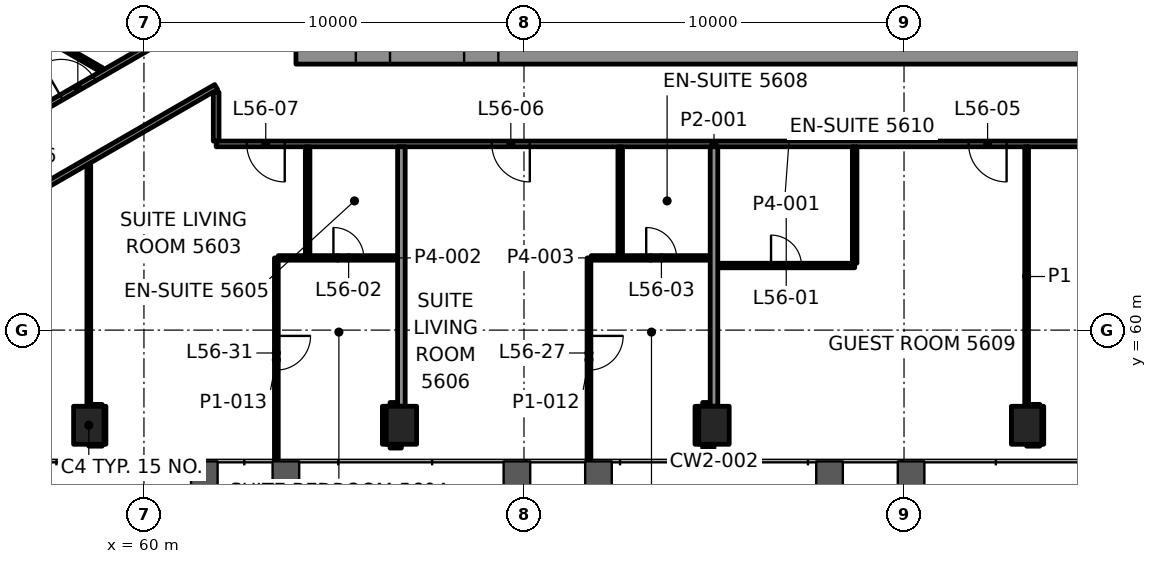
"""IFC4 building model, lengths in metres.
Left out: names, types, materials, properties, quantities, classifications, styles, units other than length and angle.
Written with IfcOpenShell. Run it as: python <this file> out.ifc"""

import sys

from ifc_helpers import new_model, si_unit, direction, frame, frame_2d, origin, origin_2d, place, context, subcontext, project, spatial, rectangle, hollow_rectangle, extrude, element, fill, save


model = new_model("IFC4")
c1 = context("Model", 3, precision=1e-05, world=origin(), true_north=direction((0.0, 1.0)))
c2 = subcontext(c1, "Body", "Model", "MODEL_VIEW")
j1 = project(units=[si_unit("LENGTHUNIT", "METRE"), si_unit("PLANEANGLEUNIT", "RADIAN")], contexts=[c1])
p1 = place(None, origin())
s1 = spatial("IfcSite", under=j1, at=p1, CompositionType="ELEMENT")
p2 = place(p1, origin())
s2 = spatial("IfcBuilding", under=s1, at=p2, CompositionType="ELEMENT")
p3 = place(p2, frame((0.0, 0.0, 237.7)))
s3 = spatial("IfcBuildingStorey", under=s2, at=p3, CompositionType="ELEMENT", Elevation=237.7)
for number, where, z_axis, x_axis in (
    (1, (58.549, 57.496, -0.0), (0.0, 0.0, 1.0), (1.0, 0.0, 0.0)),
    (2, (66.774, 57.496, -0.0), (0.0, 0.0, 1.0), (1.0, 0.0, 0.0)),
    (3, (75.0, 57.496, -0.0), (0.0, 0.0, 1.0), (1.0, 0.0, 0.0)),
    (4, (83.226, 57.496, -0.0), (0.0, 0.0, 1.0), (1.0, 0.0, 0.0)),
):
    element("IfcColumn", number, at=place(p3, frame(where, z_axis=z_axis, x_axis=x_axis)), inside=s3, PredefinedType="COLUMN", context=c2, shape_type="SweptSolid", body=[
        extrude(hollow_rectangle(XDim=0.8, YDim=1.0, WallThickness=0.05, at=origin_2d()), origin(), (0.0, 0.0, 1.0), 3.9),
    ])
p4 = place(p3, frame((64.0, 67.375, 0.0), z_axis=(0.0, 0.0, 1.0), x_axis=(1.0, 0.0, 0.0)))
e5 = element("IfcWall", 5, at=p4, inside=s3, PredefinedType="SHEAR", context=c2, shape_type="SweptSolid", body=[
    extrude(rectangle(XDim=22.0, YDim=0.75, at=frame_2d((11.0, 0.0))), origin(), (0.0, 0.0, 1.0), 3.6),
])
p5 = place(p4, frame((1.575, 0.0, 0.0)))
e6 = element("IfcOpeningElement", 6, at=p5, cuts=e5, PredefinedType="OPENING", context=c2, shape_type="SweptSolid", body=[
    extrude(rectangle(XDim=0.9, YDim=2.1, at=frame_2d((0.45, 1.05))), frame((0.0, 0.385, 0.0), z_axis=(0.0, -1.0, 0.0), x_axis=(1.0, 0.0, 0.0)), (0.0, 0.0, 1.0), 0.77),
])
p6 = place(p4, frame((4.425, 0.0, 0.0)))
e7 = element("IfcOpeningElement", 7, at=p6, cuts=e5, PredefinedType="OPENING", context=c2, shape_type="SweptSolid", body=[
    extrude(rectangle(XDim=0.9, YDim=2.1, at=frame_2d((0.45, 1.05))), frame((0.0, 0.385, 0.0), z_axis=(0.0, -1.0, 0.0), x_axis=(1.0, 0.0, 0.0)), (0.0, 0.0, 1.0), 0.77),
])
p7 = place(p3, frame((58.549, 56.996, 0.0), z_axis=(0.0, 0.0, 1.0), x_axis=(1.0, 0.0, 0.0)))
e8 = element("IfcWall", 8, at=p7, inside=s3, PredefinedType="PARTITIONING", context=c2, shape_type="SweptSolid", body=[
    extrude(rectangle(XDim=0.35, YDim=0.1, at=frame_2d((0.175, 0.0))), origin(), (0.0, 0.0, 1.0), 3.0),
])
for number, where, z_axis, x_axis in (
    (9, (66.475, 56.996, 0.0), (0.0, 0.0, 1.0), (1.0, 0.0, 0.0)),
    (10, (74.7, 56.996, 0.0), (0.0, 0.0, 1.0), (1.0, 0.0, 0.0)),
):
    element("IfcWall", number, at=place(p3, frame(where, z_axis=z_axis, x_axis=x_axis)), inside=s3, PredefinedType="PARTITIONING", context=c2, shape_type="SweptSolid", body=[
        extrude(rectangle(XDim=0.299, YDim=0.2, at=frame_2d((0.149, 0.0))), origin(), (0.0, 0.0, 1.0), 3.0),
    ])
p8 = place(p3, frame((83.226, 56.996, 0.0), z_axis=(0.0, 0.0, 1.0), x_axis=(1.0, 0.0, 0.0)))
e11 = element("IfcWall", 11, at=p8, inside=s3, PredefinedType="PARTITIONING", context=c2, shape_type="SweptSolid", body=[
    extrude(rectangle(XDim=0.349, YDim=0.1, at=frame_2d((0.175, 0.0))), origin(), (0.0, 0.0, 1.0), 3.0),
])
p9 = place(p3, frame((58.609, 57.996, 0.0), z_axis=(0.0, 0.0, 1.0), x_axis=(1.0, 0.0, 0.0)))
e12 = element("IfcWall", 12, at=p9, inside=s3, PredefinedType="PARTITIONING", context=c2, shape_type="SweptSolid", body=[
    extrude(rectangle(XDim=0.29, YDim=0.1, at=frame_2d((0.145, 0.0))), origin(), (0.0, 0.0, 1.0), 3.0),
])
p10 = place(p3, frame((66.475, 57.996, 0.0), z_axis=(0.0, 0.0, 1.0), x_axis=(1.0, 0.0, 0.0)))
e13 = element("IfcWall", 13, at=p10, inside=s3, PredefinedType="PARTITIONING", context=c2, shape_type="SweptSolid", body=[
    extrude(rectangle(XDim=0.199, YDim=0.2, at=frame_2d((0.1, 0.0))), origin(), (0.0, 0.0, 1.0), 3.0),
])
p11 = place(p3, frame((74.7, 57.996, 0.0), z_axis=(0.0, 0.0, 1.0), x_axis=(1.0, 0.0, 0.0)))
e14 = element("IfcWall", 14, at=p11, inside=s3, PredefinedType="PARTITIONING", context=c2, shape_type="SweptSolid", body=[
    extrude(rectangle(XDim=0.199, YDim=0.2, at=frame_2d((0.1, 0.0))), origin(), (0.0, 0.0, 1.0), 3.0),
])
p12 = place(p3, frame((83.286, 57.996, 0.0), z_axis=(0.0, 0.0, 1.0), x_axis=(1.0, 0.0, 0.0)))
e15 = element("IfcWall", 15, at=p12, inside=s3, PredefinedType="PARTITIONING", context=c2, shape_type="SweptSolid", body=[
    extrude(rectangle(XDim=0.289, YDim=0.1, at=frame_2d((0.145, 0.0))), origin(), (0.0, 0.0, 1.0), 3.0),
])
p13 = place(p3, frame((75.1, 61.7, 0.0), z_axis=(0.0, 0.0, 1.0), x_axis=(1.0, 0.0, 0.0)))
e16 = element("IfcWall", 16, at=p13, inside=s3, PredefinedType="PARTITIONING", context=c2, shape_type="SweptSolid", body=[
    extrude(rectangle(XDim=3.601, YDim=0.12, at=frame_2d((1.801, 0.0))), origin(), (0.0, 0.0, 1.0), 3.0),
])
p14 = place(p13, frame((1.401, 0.0, 0.0)))
e17 = element("IfcOpeningElement", 17, at=p14, cuts=e16, PredefinedType="OPENING", context=c2, shape_type="SweptSolid", body=[
    extrude(rectangle(XDim=0.8, YDim=2.1, at=frame_2d((0.4, 1.05))), frame((0.0, 0.07, 0.0), z_axis=(0.0, -1.0, 0.0), x_axis=(1.0, 0.0, 0.0)), (0.0, 0.0, 1.0), 0.14),
])
p15 = place(p3, frame((63.534, 61.9, 0.0), z_axis=(0.0, 0.0, 1.0), x_axis=(1.0, 0.0, 0.0)))
e18 = element("IfcWall", 18, at=p15, inside=s3, PredefinedType="PARTITIONING", context=c2, shape_type="SweptSolid", body=[
    extrude(rectangle(XDim=3.13, YDim=0.12, at=frame_2d((1.565, 0.0))), origin(), (0.0, 0.0, 1.0), 3.0),
])
p16 = place(p15, frame((1.451, 0.0, 0.0)))
e19 = element("IfcOpeningElement", 19, at=p16, cuts=e18, PredefinedType="OPENING", context=c2, shape_type="SweptSolid", body=[
    extrude(rectangle(XDim=0.8, YDim=2.1, at=frame_2d((0.4, 1.05))), frame((0.0, 0.07, 0.0), z_axis=(0.0, -1.0, 0.0), x_axis=(1.0, 0.0, 0.0)), (0.0, 0.0, 1.0), 0.14),
])
p17 = place(p3, frame((71.77, 61.9, 0.0), z_axis=(0.0, 0.0, 1.0), x_axis=(1.0, 0.0, 0.0)))
e20 = element("IfcWall", 20, at=p17, inside=s3, PredefinedType="PARTITIONING", context=c2, shape_type="SweptSolid", body=[
    extrude(rectangle(XDim=3.13, YDim=0.12, at=frame_2d((1.565, 0.0))), origin(), (0.0, 0.0, 1.0), 3.0),
])
p18 = place(p17, frame((1.446, 0.0, 0.0)))
e21 = element("IfcOpeningElement", 21, at=p18, cuts=e20, PredefinedType="OPENING", context=c2, shape_type="SweptSolid", body=[
    extrude(rectangle(XDim=0.8, YDim=2.1, at=frame_2d((0.4, 1.05))), frame((0.0, 0.07, 0.0), z_axis=(0.0, -1.0, 0.0), x_axis=(1.0, 0.0, 0.0)), (0.0, 0.0, 1.0), 0.14),
])
p19 = place(p3, frame((88.099, 64.9, 0.0), z_axis=(0.0, 0.0, 1.0), x_axis=(-1.0, 0.0, 0.0)))
e22 = element("IfcWall", 22, at=p19, inside=s3, PredefinedType="PARTITIONING", context=c2, shape_type="SweptSolid", body=[
    extrude(rectangle(XDim=26.199, YDim=0.15, at=frame_2d((13.1, 0.0))), origin(), (0.0, 0.0, 1.0), 3.0),
])
p20 = place(p19, frame((2.088, 0.0, 0.0)))
e23 = element("IfcOpeningElement", 23, at=p20, cuts=e22, PredefinedType="OPENING", context=c2, shape_type="SweptSolid", body=[
    extrude(rectangle(XDim=0.9, YDim=2.1, at=frame_2d((0.45, 1.05))), frame((0.0, 0.085, 0.0), z_axis=(0.0, -1.0, 0.0), x_axis=(1.0, 0.0, 0.0)), (0.0, 0.0, 1.0), 0.17),
])
p21 = place(p19, frame((5.4, 0.0, 0.0)))
e24 = element("IfcOpeningElement", 24, at=p21, cuts=e22, PredefinedType="OPENING", context=c2, shape_type="SweptSolid", body=[
    extrude(rectangle(XDim=1.0, YDim=2.1, at=frame_2d((0.5, 1.05))), frame((0.0, 0.085, 0.0), z_axis=(0.0, -1.0, 0.0), x_axis=(1.0, 0.0, 0.0)), (0.0, 0.0, 1.0), 0.17),
])
p22 = place(p19, frame((17.946, 0.0, 0.0)))
e25 = element("IfcOpeningElement", 25, at=p22, cuts=e22, PredefinedType="OPENING", context=c2, shape_type="SweptSolid", body=[
    extrude(rectangle(XDim=1.0, YDim=2.1, at=frame_2d((0.5, 1.05))), frame((0.0, 0.085, 0.0), z_axis=(0.0, -1.0, 0.0), x_axis=(1.0, 0.0, 0.0)), (0.0, 0.0, 1.0), 0.17),
])
p23 = place(p19, frame((24.395, 0.0, 0.0)))
e26 = element("IfcOpeningElement", 26, at=p23, cuts=e22, PredefinedType="OPENING", context=c2, shape_type="SweptSolid", body=[
    extrude(rectangle(XDim=1.0, YDim=2.1, at=frame_2d((0.5, 1.05))), frame((0.0, 0.085, 0.0), z_axis=(0.0, -1.0, 0.0), x_axis=(1.0, 0.0, 0.0)), (0.0, 0.0, 1.0), 0.17),
])
p24 = place(p3, frame((61.9, 66.397, 0.0), z_axis=(0.0, 0.0, 1.0), x_axis=(-0.866028172479, -0.49999520445, 0.0)))
e27 = element("IfcWall", 27, at=p24, inside=s3, PredefinedType="PARTITIONING", context=c2, shape_type="SweptSolid", body=[
    extrude(rectangle(XDim=11.726, YDim=0.15, at=frame_2d((5.863, 0.0))), origin(), (0.0, 0.0, 1.0), 2.847),
])
p25 = place(p24, frame((7.246, 0.0, 0.0)))
e28 = element("IfcOpeningElement", 28, at=p25, cuts=e27, PredefinedType="OPENING", context=c2, shape_type="SweptSolid", body=[
    extrude(rectangle(XDim=0.9, YDim=2.1, at=frame_2d((0.45, 1.05))), frame((0.0, 0.085, 0.0), z_axis=(0.0, -1.0, 0.0), x_axis=(1.0, 0.0, 0.0)), (0.0, 0.0, 1.0), 0.17),
])
p26 = place(p3, frame((50.844, 62.093, 0.0), z_axis=(0.0, 0.0, 1.0), x_axis=(0.866032955338, 0.499986920098, 0.0)))
e29 = element("IfcWall", 29, at=p26, inside=s3, PredefinedType="PARTITIONING", context=c2, shape_type="SweptSolid", body=[
    extrude(rectangle(XDim=12.679, YDim=0.15, at=frame_2d((6.339, 0.0))), origin(), (0.0, 0.0, 1.0), 3.0),
])
p27 = place(p26, frame((0.175, 0.0, 0.0)))
e30 = element("IfcOpeningElement", 30, at=p27, cuts=e29, PredefinedType="OPENING", context=c2, shape_type="SweptSolid", body=[
    extrude(rectangle(XDim=1.0, YDim=2.1, at=frame_2d((0.5, 1.05))), frame((0.0, 0.085, 0.0), z_axis=(0.0, -1.0, 0.0), x_axis=(1.0, 0.0, 0.0)), (0.0, 0.0, 1.0), 0.17),
])
p28 = place(p26, frame((8.063, 0.0, 0.0)))
e31 = element("IfcOpeningElement", 31, at=p28, cuts=e29, PredefinedType="OPENING", context=c2, shape_type="SweptSolid", body=[
    extrude(rectangle(XDim=1.0, YDim=2.1, at=frame_2d((0.5, 1.05))), frame((0.0, 0.085, 0.0), z_axis=(0.0, -1.0, 0.0), x_axis=(1.0, 0.0, 0.0)), (0.0, 0.0, 1.0), 0.17),
])
p29 = place(p3, frame((83.626, 56.997, 0.0), z_axis=(0.0, 0.0, 1.0), x_axis=(0.0, 1.0, 0.0)))
e32 = element("IfcWall", 32, at=p29, inside=s3, PredefinedType="PARTITIONING", context=c2, shape_type="SweptSolid", body=[
    extrude(rectangle(XDim=0.999, YDim=0.1, at=frame_2d((0.5, 0.0))), origin(), (0.0, 0.0, 1.0), 2.922),
])
p30 = place(p3, frame((83.226, 57.996, 0.0), z_axis=(0.0, 0.0, 1.0), x_axis=(0.0, 1.0, 0.0)))
e33 = element("IfcWall", 33, at=p30, inside=s3, PredefinedType="PARTITIONING", context=c2, shape_type="SweptSolid", body=[
    extrude(rectangle(XDim=6.829, YDim=0.1, at=frame_2d((3.415, 0.0))), origin(), (0.0, 0.0, 1.0), 3.0),
])
p31 = place(p3, frame((78.701, 61.76, 0.0), z_axis=(0.0, 0.0, 1.0), x_axis=(0.0, 1.0, 0.0)))
e34 = element("IfcWall", 34, at=p31, inside=s3, PredefinedType="PARTITIONING", context=c2, shape_type="SweptSolid", body=[
    extrude(rectangle(XDim=3.065, YDim=0.12, at=frame_2d((1.532, 0.0))), origin(), (0.0, 0.0, 1.0), 3.0),
])
p32 = place(p3, frame((75.0, 57.997, 0.0), z_axis=(0.0, 0.0, 1.0), x_axis=(0.0, 1.0, 0.0)))
e35 = element("IfcWall", 35, at=p32, inside=s3, PredefinedType="PARTITIONING", context=c2, shape_type="SweptSolid", body=[
    extrude(rectangle(XDim=6.828, YDim=0.2, at=frame_2d((3.414, 0.0))), origin(), (0.0, 0.0, 1.0), 3.0),
])
p33 = place(p3, frame((74.6, 56.997, 0.0), z_axis=(0.0, 0.0, 1.0), x_axis=(0.0, 1.0, 0.0)))
e36 = element("IfcWall", 36, at=p33, inside=s3, PredefinedType="PARTITIONING", context=c2, shape_type="SweptSolid", body=[
    extrude(rectangle(XDim=0.999, YDim=0.2, at=frame_2d((0.5, 0.0))), origin(), (0.0, 0.0, 1.0), 2.922),
])
p34 = place(p3, frame((72.532, 61.96, 0.0), z_axis=(0.0, 0.0, 1.0), x_axis=(0.0, 1.0, 0.0)))
e37 = element("IfcWall", 37, at=p34, inside=s3, PredefinedType="PARTITIONING", context=c2, shape_type="SweptSolid", body=[
    extrude(rectangle(XDim=2.865, YDim=0.12, at=frame_2d((1.433, 0.0))), origin(), (0.0, 0.0, 1.0), 3.0),
])
p35 = place(p3, frame((71.71, 61.9, 0.0), z_axis=(0.0, 0.0, 1.0), x_axis=(0.0, -1.0, 0.0)))
e38 = element("IfcWall", 38, at=p35, inside=s3, PredefinedType="PARTITIONING", context=c2, shape_type="SweptSolid", body=[
    extrude(rectangle(XDim=5.364, YDim=0.1, at=frame_2d((2.682, 0.0))), origin(), (0.0, 0.0, 1.0), 2.922),
])
p36 = place(p35, frame((2.052, 0.0, 0.0)))
e39 = element("IfcOpeningElement", 39, at=p36, cuts=e38, PredefinedType="OPENING", context=c2, shape_type="SweptSolid", body=[
    extrude(rectangle(XDim=0.9, YDim=2.1, at=frame_2d((0.45, 1.05))), frame((0.0, 0.06, 0.0), z_axis=(0.0, -1.0, 0.0), x_axis=(1.0, 0.0, 0.0)), (0.0, 0.0, 1.0), 0.12),
])
p37 = place(p3, frame((66.774, 57.997, 0.0), z_axis=(0.0, 0.0, 1.0), x_axis=(0.0, 1.0, 0.0)))
e40 = element("IfcWall", 40, at=p37, inside=s3, PredefinedType="PARTITIONING", context=c2, shape_type="SweptSolid", body=[
    extrude(rectangle(XDim=6.828, YDim=0.2, at=frame_2d((3.414, 0.0))), origin(), (0.0, 0.0, 1.0), 3.0),
])
p38 = place(p3, frame((66.374, 56.997, 0.0), z_axis=(0.0, 0.0, 1.0), x_axis=(0.0, 1.0, 0.0)))
e41 = element("IfcWall", 41, at=p38, inside=s3, PredefinedType="PARTITIONING", context=c2, shape_type="SweptSolid", body=[
    extrude(rectangle(XDim=0.999, YDim=0.2, at=frame_2d((0.5, 0.0))), origin(), (0.0, 0.0, 1.0), 2.922),
])
p39 = place(p3, frame((64.307, 61.96, 0.0), z_axis=(0.0, 0.0, 1.0), x_axis=(0.0, 1.0, 0.0)))
e42 = element("IfcWall", 42, at=p39, inside=s3, PredefinedType="PARTITIONING", context=c2, shape_type="SweptSolid", body=[
    extrude(rectangle(XDim=2.865, YDim=0.12, at=frame_2d((1.433, 0.0))), origin(), (0.0, 0.0, 1.0), 3.0),
])
p40 = place(p3, frame((63.484, 61.9, 0.0), z_axis=(0.0, 0.0, 1.0), x_axis=(0.0, -1.0, 0.0)))
e43 = element("IfcWall", 43, at=p40, inside=s3, PredefinedType="PARTITIONING", context=c2, shape_type="SweptSolid", body=[
    extrude(rectangle(XDim=5.364, YDim=0.1, at=frame_2d((2.682, 0.0))), origin(), (0.0, 0.0, 1.0), 2.922),
])
p41 = place(p40, frame((2.052, 0.0, 0.0)))
e44 = element("IfcOpeningElement", 44, at=p41, cuts=e43, PredefinedType="OPENING", context=c2, shape_type="SweptSolid", body=[
    extrude(rectangle(XDim=0.9, YDim=2.1, at=frame_2d((0.45, 1.05))), frame((0.0, 0.06, 0.0), z_axis=(0.0, -1.0, 0.0), x_axis=(1.0, 0.0, 0.0)), (0.0, 0.0, 1.0), 0.12),
])
p42 = place(p3, frame((61.9, 64.975, 0.0), z_axis=(0.0, 0.0, 1.0), x_axis=(0.0, 1.0, 0.0)))
e45 = element("IfcWall", 45, at=p42, inside=s3, PredefinedType="PARTITIONING", context=c2, shape_type="SweptSolid", body=[
    extrude(rectangle(XDim=1.286, YDim=0.15, at=frame_2d((0.643, 0.0))), origin(), (0.0, 0.0, 1.0), 2.847),
])
p43 = place(p3, frame((58.949, 56.996, 0.0), z_axis=(0.0, 0.0, 1.0), x_axis=(0.0, 1.0, 0.0)))
e46 = element("IfcWall", 46, at=p43, inside=s3, PredefinedType="PARTITIONING", context=c2, shape_type="SweptSolid", body=[
    extrude(rectangle(XDim=1.0, YDim=0.1, at=frame_2d((0.5, 0.0))), origin(), (0.0, 0.0, 1.0), 2.922),
])
p44 = place(p3, frame((58.549, 57.996, 0.0), z_axis=(0.0, 0.0, 1.0), x_axis=(0.0, 1.0, 0.0)))
e47 = element("IfcWall", 47, at=p44, inside=s3, PredefinedType="PARTITIONING", context=c2, shape_type="SweptSolid", body=[
    extrude(rectangle(XDim=6.35, YDim=0.1, at=frame_2d((3.175, 0.0))), origin(), (0.0, 0.0, 1.0), 2.847),
])
p45 = place(p3, frame((58.876, 66.856, 0.0), z_axis=(0.0, 0.0, 1.0), x_axis=(-0.866028357664, 0.499994883695, 0.0)))
e48 = element("IfcWall", 48, at=p45, inside=s3, PredefinedType="PARTITIONING", context=c2, shape_type="SweptSolid", body=[
    extrude(rectangle(XDim=3.568, YDim=0.12, at=frame_2d((1.784, 0.0))), origin(), (0.0, 0.0, 1.0), 3.0),
])
p46 = place(p14, origin())
e49 = element("IfcDoor", 49, at=p46, inside=s3, OperationType="SINGLE_SWING_LEFT", PredefinedType="DOOR", context=c2, shape_type="SweptSolid", body=[
    extrude(rectangle(XDim=0.8, YDim=2.1, at=frame_2d((0.4, 1.05))), frame((0.0, 0.025, 0.0), z_axis=(0.0, -1.0, 0.0), x_axis=(1.0, 0.0, 0.0)), (0.0, 0.0, 1.0), 0.05),
])
fill(e17, e49)
p47 = place(p16, origin())
e50 = element("IfcDoor", 50, at=p47, inside=s3, OperationType="SINGLE_SWING_RIGHT", PredefinedType="DOOR", context=c2, shape_type="SweptSolid", body=[
    extrude(rectangle(XDim=0.8, YDim=2.1, at=frame_2d((0.4, 1.05))), frame((0.0, 0.025, 0.0), z_axis=(0.0, -1.0, 0.0), x_axis=(1.0, 0.0, 0.0)), (0.0, 0.0, 1.0), 0.05),
])
fill(e19, e50)
p48 = place(p18, origin())
e51 = element("IfcDoor", 51, at=p48, inside=s3, OperationType="SINGLE_SWING_LEFT", PredefinedType="DOOR", context=c2, shape_type="SweptSolid", body=[
    extrude(rectangle(XDim=0.8, YDim=2.1, at=frame_2d((0.4, 1.05))), frame((0.0, 0.025, 0.0), z_axis=(0.0, -1.0, 0.0), x_axis=(1.0, 0.0, 0.0)), (0.0, 0.0, 1.0), 0.05),
])
fill(e21, e51)
p49 = place(p21, origin())
e52 = element("IfcDoor", 52, at=p49, inside=s3, OperationType="SINGLE_SWING_LEFT", PredefinedType="DOOR", context=c2, shape_type="SweptSolid", body=[
    extrude(rectangle(XDim=1.0, YDim=2.1, at=frame_2d((0.5, 1.05))), frame((0.0, 0.025, 0.0), z_axis=(0.0, -1.0, 0.0), x_axis=(1.0, 0.0, 0.0)), (0.0, 0.0, 1.0), 0.05),
])
fill(e24, e52)
p50 = place(p22, origin())
e53 = element("IfcDoor", 53, at=p50, inside=s3, OperationType="SINGLE_SWING_RIGHT", PredefinedType="DOOR", context=c2, shape_type="SweptSolid", body=[
    extrude(rectangle(XDim=1.0, YDim=2.1, at=frame_2d((0.5, 1.05))), frame((0.0, 0.025, 0.0), z_axis=(0.0, -1.0, 0.0), x_axis=(1.0, 0.0, 0.0)), (0.0, 0.0, 1.0), 0.05),
])
fill(e25, e53)
p51 = place(p23, origin())
e54 = element("IfcDoor", 54, at=p51, inside=s3, OperationType="SINGLE_SWING_LEFT", PredefinedType="DOOR", context=c2, shape_type="SweptSolid", body=[
    extrude(rectangle(XDim=1.0, YDim=2.1, at=frame_2d((0.5, 1.05))), frame((0.0, 0.025, 0.0), z_axis=(0.0, -1.0, 0.0), x_axis=(1.0, 0.0, 0.0)), (0.0, 0.0, 1.0), 0.05),
])
fill(e26, e54)
p52 = place(p28, origin())
e55 = element("IfcDoor", 55, at=p52, inside=s3, OperationType="SINGLE_SWING_LEFT", PredefinedType="DOOR", context=c2, shape_type="SweptSolid", body=[
    extrude(rectangle(XDim=1.0, YDim=2.1, at=frame_2d((0.5, 1.05))), frame((0.0, 0.025, 0.0), z_axis=(0.0, -1.0, 0.0), x_axis=(1.0, 0.0, 0.0)), (0.0, 0.0, 1.0), 0.05),
])
fill(e31, e55)
p53 = place(p36, origin())
e56 = element("IfcDoor", 56, at=p53, inside=s3, OperationType="SINGLE_SWING_LEFT", PredefinedType="DOOR", context=c2, shape_type="SweptSolid", body=[
    extrude(rectangle(XDim=0.9, YDim=2.1, at=frame_2d((0.45, 1.05))), frame((0.0, 0.025, 0.0), z_axis=(0.0, -1.0, 0.0), x_axis=(1.0, 0.0, 0.0)), (0.0, 0.0, 1.0), 0.05),
])
fill(e39, e56)
p54 = place(p41, origin())
e57 = element("IfcDoor", 57, at=p54, inside=s3, OperationType="SINGLE_SWING_RIGHT", PredefinedType="DOOR", context=c2, shape_type="SweptSolid", body=[
    extrude(rectangle(XDim=0.9, YDim=2.1, at=frame_2d((0.45, 1.05))), frame((0.0, 0.025, 0.0), z_axis=(0.0, -1.0, 0.0), x_axis=(1.0, 0.0, 0.0)), (0.0, 0.0, 1.0), 0.05),
])
fill(e44, e57)
p55 = place(p5, origin())
e58 = element("IfcDoor", 58, at=p55, inside=s3, OperationType="SINGLE_SWING_LEFT", PredefinedType="DOOR", context=c2, shape_type="SweptSolid", body=[
    extrude(rectangle(XDim=0.9, YDim=2.1, at=frame_2d((0.45, 1.05))), frame((0.0, 0.095, 0.0), z_axis=(0.0, -1.0, 0.0), x_axis=(1.0, 0.0, 0.0)), (0.0, 0.0, 1.0), 0.19),
])
fill(e6, e58)
p56 = place(p6, origin())
e59 = element("IfcDoor", 59, at=p56, inside=s3, OperationType="SINGLE_SWING_LEFT", PredefinedType="DOOR", context=c2, shape_type="SweptSolid", body=[
    extrude(rectangle(XDim=0.9, YDim=2.1, at=frame_2d((0.45, 1.05))), frame((0.0, 0.095, 0.0), z_axis=(0.0, -1.0, 0.0), x_axis=(1.0, 0.0, 0.0)), (0.0, 0.0, 1.0), 0.19),
])
fill(e7, e59)
save(model, sys.argv[1])
